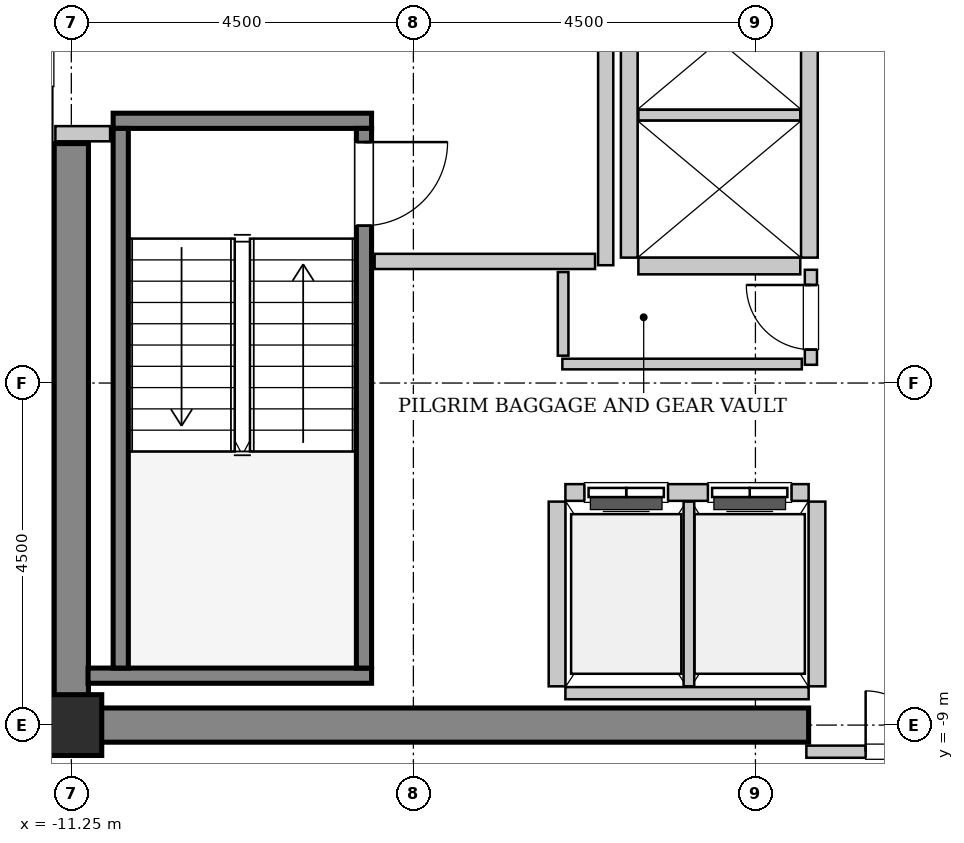
"""IFC4 building model, lengths in metres.
Left out: names, types, materials, properties, quantities, classifications, styles, units other than length and angle.
Written with IfcOpenShell. Run it as: python <this file> out.ifc"""

import sys

from ifc_helpers import new_model, si_unit, direction, frame, frame_2d, origin, origin_2d, place, context, subcontext, project, spatial, rectangle, hollow_rectangle, extrude, source, transform, mapped, element, fill, save


model = new_model("IFC4")
c1 = context("Model", 3, precision=1e-05, world=origin(), true_north=direction((0.0, 1.0)))
c2 = subcontext(c1, "Body", "Model", "MODEL_VIEW")
j1 = project(units=[si_unit("LENGTHUNIT", "METRE"), si_unit("PLANEANGLEUNIT", "RADIAN")], contexts=[c1])
p1 = place(None, origin())
s1 = spatial("IfcSite", under=j1, at=p1, CompositionType="ELEMENT")
p2 = place(p1, origin())
s2 = spatial("IfcBuilding", under=s1, at=p2, CompositionType="ELEMENT")
p3 = place(p2, frame((0.0, 0.0, 214.2)))
s3 = spatial("IfcBuildingStorey", under=s2, at=p3, CompositionType="ELEMENT", Elevation=214.2)
m1 = source(origin(), c2, "Body", "SweptSolid", [
    extrude(rectangle(XDim=9.925, YDim=0.45, at=frame_2d((4.962, 0.0))), origin(), (0.0, 0.0, 1.0), 3.8),
])
p4 = place(p3, frame((-11.475, -9.0, 0.0), z_axis=(0.0, 0.0, 1.0), x_axis=(1.0, 0.0, 0.0)))
e1 = element("IfcWall", 1, at=p4, inside=s3, PredefinedType="SHEAR", context=c2, shape_type="MappedRepresentation", body=[
    mapped(m1, transform((0.0, 0.0, 0.0), x_axis=(1.0, 0.0, 0.0), y_axis=(0.0, 1.0, 0.0), z_axis=(0.0, 0.0, 1.0), scale=1.0)),
])
m2 = source(origin(), c2, "Body", "SweptSolid", [
    extrude(rectangle(XDim=7.425, YDim=0.45, at=frame_2d((3.712, 0.0))), origin(), (0.0, 0.0, 1.0), 3.8),
])
p5 = place(p3, frame((-11.25, -8.775, 0.0), z_axis=(0.0, 0.0, 1.0), x_axis=(0.0, 1.0, 0.0)))
e2 = element("IfcWall", 2, at=p5, inside=s3, PredefinedType="SHEAR", context=c2, shape_type="MappedRepresentation", body=[
    mapped(m2, transform((0.0, 0.0, 0.0), x_axis=(1.0, 0.0, 0.0), y_axis=(0.0, 1.0, 0.0), z_axis=(0.0, 0.0, 1.0), scale=1.0)),
])
m3 = source(origin(), c2, "Body", "SweptSolid", [
    extrude(hollow_rectangle(XDim=0.8, YDim=0.8, WallThickness=0.04, InnerFilletRadius=0.04, OuterFilletRadius=0.08, at=origin_2d()), origin(), (0.0, 0.0, 1.0), 3.8),
])
p6 = place(p3, frame((-11.25, -9.0, 0.0), z_axis=(0.0, 0.0, 1.0), x_axis=(1.0, 0.0, 0.0)))
e3 = element("IfcColumn", 3, at=p6, inside=s3, PredefinedType="COLUMN", context=c2, shape_type="MappedRepresentation", body=[
    mapped(m3, transform((0.0, 0.0, 0.0), x_axis=(1.0, 0.0, 0.0), y_axis=(0.0, 1.0, 0.0), z_axis=(0.0, 0.0, 1.0), scale=1.0)),
])
m4 = source(origin(), c2, "Body", "SweptSolid", [
    extrude(rectangle(XDim=3.4, YDim=0.2, at=frame_2d((1.7, 0.0))), origin(), (0.0, 0.0, 1.0), 3.8),
])
p7 = place(p3, frame((-10.7, -1.05, 0.0), z_axis=(0.0, 0.0, 1.0), x_axis=(1.0, 0.0, 0.0)))
e4 = element("IfcWall", 4, at=p7, inside=s3, PredefinedType="SOLIDWALL", context=c2, shape_type="MappedRepresentation", body=[
    mapped(m4, transform((0.0, 0.0, 0.0), x_axis=(1.0, 0.0, 0.0), y_axis=(0.0, 1.0, 0.0), z_axis=(0.0, 0.0, 1.0), scale=1.0)),
])
m5 = source(origin(), c2, "Body", "SweptSolid", [
    extrude(rectangle(XDim=3.73, YDim=0.2, at=frame_2d((1.865, 0.0))), origin(), (0.0, 0.0, 1.0), 3.8),
])
p8 = place(p3, frame((-11.03, -8.35, 0.0), z_axis=(0.0, 0.0, 1.0), x_axis=(1.0, 0.0, 0.0)))
e5 = element("IfcWall", 5, at=p8, inside=s3, PredefinedType="SOLIDWALL", context=c2, shape_type="MappedRepresentation", body=[
    mapped(m5, transform((0.0, 0.0, 0.0), x_axis=(1.0, 0.0, 0.0), y_axis=(0.0, 1.0, 0.0), z_axis=(0.0, 0.0, 1.0), scale=1.0)),
])
m6 = source(origin(), c2, "Body", "SweptSolid", [
    extrude(rectangle(XDim=7.1, YDim=0.2, at=frame_2d((3.55, 0.0))), origin(), (0.0, 0.0, 1.0), 3.8),
])
p9 = place(p3, frame((-10.6, -1.15, 0.0), z_axis=(0.0, 0.0, 1.0), x_axis=(0.0, -1.0, 0.0)))
e6 = element("IfcWall", 6, at=p9, inside=s3, PredefinedType="SOLIDWALL", context=c2, shape_type="MappedRepresentation", body=[
    mapped(m6, transform((0.0, 0.0, 0.0), x_axis=(1.0, 0.0, 0.0), y_axis=(0.0, 1.0, 0.0), z_axis=(0.0, 0.0, 1.0), scale=1.0)),
])
p10 = place(p3, frame((-7.4, -1.15, 0.0), z_axis=(0.0, 0.0, 1.0), x_axis=(0.0, -1.0, 0.0)))
e7 = element("IfcWall", 7, at=p10, inside=s3, PredefinedType="SOLIDWALL", context=c2, shape_type="MappedRepresentation", body=[
    mapped(m6, transform((0.0, 0.0, 0.0), x_axis=(1.0, 0.0, 0.0), y_axis=(0.0, 1.0, 0.0), z_axis=(0.0, 0.0, 1.0), scale=1.0)),
])
p11 = place(p10, frame((0.18, 0.0, 0.0)))
e8 = element("IfcOpeningElement", 8, at=p11, cuts=e7, PredefinedType="OPENING", context=c2, shape_type="SweptSolid", body=[
    extrude(rectangle(XDim=1.1, YDim=2.15, at=frame_2d((0.55, 1.075))), frame((0.0, 0.11, 0.0), z_axis=(0.0, -1.0, 0.0), x_axis=(1.0, 0.0, 0.0)), (0.0, 0.0, 1.0), 0.22),
])
m7 = source(origin(), c2, "Body", "SweptSolid", [
    extrude(rectangle(XDim=3.2, YDim=0.22, at=frame_2d((1.6, 0.0))), origin(), (0.0, 0.0, 1.0), 3.535),
])
p12 = place(p3, frame((-1.55, -5.94, 0.0), z_axis=(0.0, 0.0, 1.0), x_axis=(-1.0, 0.0, 0.0)))
e9 = element("IfcWall", 9, at=p12, inside=s3, PredefinedType="SOLIDWALL", context=c2, shape_type="MappedRepresentation", body=[
    mapped(m7, transform((0.0, 0.0, 0.0), x_axis=(1.0, 0.0, 0.0), y_axis=(0.0, 1.0, 0.0), z_axis=(0.0, 0.0, 1.0), scale=1.0)),
])
p13 = place(p12, frame((1.85, 0.0, 0.0)))
e10 = element("IfcOpeningElement", 10, at=p13, cuts=e9, PredefinedType="OPENING", context=c2, shape_type="SweptSolid", body=[
    extrude(rectangle(XDim=1.1, YDim=2.2, at=frame_2d((0.55, 1.1))), frame((0.0, 0.12, 0.0), z_axis=(0.0, -1.0, 0.0), x_axis=(1.0, 0.0, 0.0)), (0.0, 0.0, 1.0), 0.24),
])
p14 = place(p12, frame((0.225, 0.0, 0.0)))
e11 = element("IfcOpeningElement", 11, at=p14, cuts=e9, PredefinedType="OPENING", context=c2, shape_type="SweptSolid", body=[
    extrude(rectangle(XDim=1.1, YDim=2.2, at=frame_2d((0.55, 1.1))), frame((0.0, 0.12, 0.0), z_axis=(0.0, -1.0, 0.0), x_axis=(1.0, 0.0, 0.0)), (0.0, 0.0, 1.0), 0.24),
])
m8 = source(origin(), c2, "Body", "SweptSolid", [
    extrude(rectangle(XDim=3.2, YDim=0.16, at=frame_2d((1.6, 0.0))), origin(), (0.0, 0.0, 1.0), 2.625),
])
p15 = place(p3, frame((-4.75, -8.58, 0.0), z_axis=(0.0, 0.0, 1.0), x_axis=(1.0, 0.0, 0.0)))
e12 = element("IfcWall", 12, at=p15, inside=s3, PredefinedType="PARTITIONING", context=c2, shape_type="MappedRepresentation", body=[
    mapped(m8, transform((0.0, 0.0, 0.0), x_axis=(1.0, 0.0, 0.0), y_axis=(0.0, 1.0, 0.0), z_axis=(0.0, 0.0, 1.0), scale=1.0)),
])
m9 = source(origin(), c2, "Body", "SweptSolid", [
    extrude(rectangle(XDim=2.43, YDim=0.22, at=frame_2d((1.215, 0.0))), origin(), (0.0, 0.0, 1.0), 3.535),
])
p16 = place(p3, frame((-4.86, -6.06, 0.0), z_axis=(0.0, 0.0, 1.0), x_axis=(0.0, -1.0, 0.0)))
e13 = element("IfcWall", 13, at=p16, inside=s3, PredefinedType="SOLIDWALL", context=c2, shape_type="MappedRepresentation", body=[
    mapped(m9, transform((0.0, 0.0, 0.0), x_axis=(1.0, 0.0, 0.0), y_axis=(0.0, 1.0, 0.0), z_axis=(0.0, 0.0, 1.0), scale=1.0)),
])
m10 = source(origin(), c2, "Body", "SweptSolid", [
    extrude(rectangle(XDim=2.43, YDim=0.14, at=frame_2d((1.215, 0.0))), origin(), (0.0, 0.0, 1.0), 3.535),
])
p17 = place(p3, frame((-3.125, -8.49, 0.0), z_axis=(0.0, 0.0, 1.0), x_axis=(0.0, 1.0, 0.0)))
e14 = element("IfcWall", 14, at=p17, inside=s3, PredefinedType="PARTITIONING", context=c2, shape_type="MappedRepresentation", body=[
    mapped(m10, transform((0.0, 0.0, 0.0), x_axis=(1.0, 0.0, 0.0), y_axis=(0.0, 1.0, 0.0), z_axis=(0.0, 0.0, 1.0), scale=1.0)),
])
p18 = place(p3, frame((-1.44, -8.49, 0.0), z_axis=(0.0, 0.0, 1.0), x_axis=(0.0, 1.0, 0.0)))
e15 = element("IfcWall", 15, at=p18, inside=s3, PredefinedType="SOLIDWALL", context=c2, shape_type="MappedRepresentation", body=[
    mapped(m9, transform((0.0, 0.0, 0.0), x_axis=(1.0, 0.0, 0.0), y_axis=(0.0, 1.0, 0.0), z_axis=(0.0, 0.0, 1.0), scale=1.0)),
])
m11 = source(origin(), c2, "Body", "SweptSolid", [
    extrude(rectangle(XDim=5.7, YDim=0.22, at=frame_2d((2.85, 0.0))), origin(), (0.0, 0.0, 1.0), 3.535),
])
for number, where, z_axis, x_axis in (
    (16, (-1.54, -2.85, 0.0), (0.0, 0.0, 1.0), (0.0, 1.0, 0.0)),
    (17, (-3.91, 2.85, 0.0), (0.0, 0.0, 1.0), (0.0, -1.0, 0.0)),
):
    element("IfcWall", number, at=place(p3, frame(where, z_axis=z_axis, x_axis=x_axis)), inside=s3, PredefinedType="SOLIDWALL", context=c2, shape_type="MappedRepresentation", body=[
        mapped(m11, transform((0.0, 0.0, 0.0), x_axis=(1.0, 0.0, 0.0), y_axis=(0.0, 1.0, 0.0), z_axis=(0.0, 0.0, 1.0), scale=1.0)),
    ])
m12 = source(origin(), c2, "Body", "SweptSolid", [
    extrude(rectangle(XDim=2.13, YDim=0.22, at=frame_2d((1.065, 0.0))), origin(), (0.0, 0.0, 1.0), 3.535),
])
p19 = place(p3, frame((-3.79, -2.96, 0.0), z_axis=(0.0, 0.0, 1.0), x_axis=(1.0, 0.0, 0.0)))
e18 = element("IfcWall", 18, at=p19, inside=s3, PredefinedType="SOLIDWALL", context=c2, shape_type="MappedRepresentation", body=[
    mapped(m12, transform((0.0, 0.0, 0.0), x_axis=(1.0, 0.0, 0.0), y_axis=(0.0, 1.0, 0.0), z_axis=(0.0, 0.0, 1.0), scale=1.0)),
])
m13 = source(origin(), c2, "Body", "SweptSolid", [
    extrude(rectangle(XDim=2.13, YDim=0.14, at=frame_2d((1.065, 0.0))), origin(), (0.0, 0.0, 1.0), 3.535),
])
p20 = place(p3, frame((-3.79, -0.975, 0.0), z_axis=(0.0, 0.0, 1.0), x_axis=(1.0, 0.0, 0.0)))
e19 = element("IfcWall", 19, at=p20, inside=s3, PredefinedType="PARTITIONING", context=c2, shape_type="MappedRepresentation", body=[
    mapped(m13, transform((0.0, 0.0, 0.0), x_axis=(1.0, 0.0, 0.0), y_axis=(0.0, 1.0, 0.0), z_axis=(0.0, 0.0, 1.0), scale=1.0)),
])
m14 = source(origin(), c2, "Body", "SweptSolid", [
    extrude(rectangle(XDim=5.9, YDim=0.2, at=frame_2d((2.95, 0.0))), origin(), (0.0, 0.0, 1.0), 3.535),
])
p21 = place(p3, frame((-4.22, -2.95, 0.0), z_axis=(0.0, 0.0, 1.0), x_axis=(0.0, 1.0, 0.0)))
e20 = element("IfcWall", 20, at=p21, inside=s3, PredefinedType="PARTITIONING", context=c2, shape_type="MappedRepresentation", body=[
    mapped(m14, transform((0.0, 0.0, 0.0), x_axis=(1.0, 0.0, 0.0), y_axis=(0.0, 1.0, 0.0), z_axis=(0.0, 0.0, 1.0), scale=1.0)),
])
m15 = source(origin(), c2, "Body", "SweptSolid", [
    extrude(rectangle(XDim=2.9, YDim=0.2, at=frame_2d((1.45, 0.0))), origin(), (0.0, 0.0, 1.0), 3.535),
])
p22 = place(p3, frame((-7.26, -2.9, 0.0), z_axis=(0.0, 0.0, 1.0), x_axis=(1.0, 0.0, 0.0)))
e21 = element("IfcWall", 21, at=p22, inside=s3, PredefinedType="PARTITIONING", context=c2, shape_type="MappedRepresentation", body=[
    mapped(m15, transform((0.0, 0.0, 0.0), x_axis=(1.0, 0.0, 0.0), y_axis=(0.0, 1.0, 0.0), z_axis=(0.0, 0.0, 1.0), scale=1.0)),
])
m16 = source(origin(), c2, "Body", "SweptSolid", [
    extrude(rectangle(XDim=0.72, YDim=0.2, at=frame_2d((0.36, 0.0))), origin(), (0.0, 0.0, 1.0), 3.535),
])
p23 = place(p3, frame((-11.46, -1.22, 0.0), z_axis=(0.0, 0.0, 1.0), x_axis=(1.0, 0.0, 0.0)))
e22 = element("IfcWall", 22, at=p23, inside=s3, PredefinedType="PARTITIONING", context=c2, shape_type="MappedRepresentation", body=[
    mapped(m16, transform((0.0, 0.0, 0.0), x_axis=(1.0, 0.0, 0.0), y_axis=(0.0, 1.0, 0.0), z_axis=(0.0, 0.0, 1.0), scale=1.0)),
])
m17 = source(origin(), c2, "Body", "SweptSolid", [
    extrude(rectangle(XDim=3.16, YDim=0.16, at=frame_2d((1.58, 0.0))), origin(), (0.0, 0.0, 1.0), 2.625),
])
p24 = place(p3, frame((-1.58, -9.35, 0.0), z_axis=(0.0, 0.0, 1.0), x_axis=(1.0, 0.0, 0.0)))
e23 = element("IfcWall", 23, at=p24, inside=s3, PredefinedType="PARTITIONING", context=c2, shape_type="MappedRepresentation", body=[
    mapped(m17, transform((0.0, 0.0, 0.0), x_axis=(1.0, 0.0, 0.0), y_axis=(0.0, 1.0, 0.0), z_axis=(0.0, 0.0, 1.0), scale=1.0)),
])
p25 = place(p24, frame((0.78, 0.0, 0.0)))
e24 = element("IfcOpeningElement", 24, at=p25, cuts=e23, PredefinedType="OPENING", context=c2, shape_type="SweptSolid", body=[
    extrude(rectangle(XDim=1.6, YDim=2.3, at=frame_2d((0.8, 1.15))), frame((0.0, 0.09, 0.0), z_axis=(0.0, -1.0, 0.0), x_axis=(1.0, 0.0, 0.0)), (0.0, 0.0, 1.0), 0.18),
])
m18 = source(origin(), c2, "Body", "SweptSolid", [
    extrude(rectangle(XDim=1.25, YDim=0.16, at=frame_2d((0.625, 0.0))), origin(), (0.0, 0.0, 1.0), 3.535),
])
p26 = place(p3, frame((-1.52, -4.26, 0.0), z_axis=(0.0, 0.0, 1.0), x_axis=(0.0, 1.0, 0.0)))
e25 = element("IfcWall", 25, at=p26, inside=s3, PredefinedType="PARTITIONING", context=c2, shape_type="MappedRepresentation", body=[
    mapped(m18, transform((0.0, 0.0, 0.0), x_axis=(1.0, 0.0, 0.0), y_axis=(0.0, 1.0, 0.0), z_axis=(0.0, 0.0, 1.0), scale=1.0)),
])
p27 = place(p26, frame((0.2, 0.0, 0.0)))
e26 = element("IfcOpeningElement", 26, at=p27, cuts=e25, PredefinedType="OPENING", context=c2, shape_type="SweptSolid", body=[
    extrude(rectangle(XDim=0.85, YDim=2.1, at=frame_2d((0.425, 1.05))), frame((0.0, 0.09, 0.0), z_axis=(0.0, -1.0, 0.0), x_axis=(1.0, 0.0, 0.0)), (0.0, 0.0, 1.0), 0.18),
])
m19 = source(origin(), c2, "Body", "SweptSolid", [
    extrude(rectangle(XDim=3.15, YDim=0.14, at=frame_2d((1.575, 0.0))), origin(), (0.0, 0.0, 1.0), 3.535),
])
p28 = place(p3, frame((-4.79, -4.25, 0.0), z_axis=(0.0, 0.0, 1.0), x_axis=(1.0, 0.0, 0.0)))
e27 = element("IfcWall", 27, at=p28, inside=s3, PredefinedType="PARTITIONING", context=c2, shape_type="MappedRepresentation", body=[
    mapped(m19, transform((0.0, 0.0, 0.0), x_axis=(1.0, 0.0, 0.0), y_axis=(0.0, 1.0, 0.0), z_axis=(0.0, 0.0, 1.0), scale=1.0)),
])
m20 = source(origin(), c2, "Body", "SweptSolid", [
    extrude(rectangle(XDim=1.1, YDim=0.14, at=frame_2d((0.55, 0.0))), origin(), (0.0, 0.0, 1.0), 3.535),
])
p29 = place(p3, frame((-4.78, -4.14, 0.0), z_axis=(0.0, 0.0, 1.0), x_axis=(0.0, 1.0, 0.0)))
e28 = element("IfcWall", 28, at=p29, inside=s3, PredefinedType="PARTITIONING", context=c2, shape_type="MappedRepresentation", body=[
    mapped(m20, transform((0.0, 0.0, 0.0), x_axis=(1.0, 0.0, 0.0), y_axis=(0.0, 1.0, 0.0), z_axis=(0.0, 0.0, 1.0), scale=1.0)),
])
m21 = source(origin(), c2, "Body", "SweptSolid", [
    extrude(rectangle(XDim=1.1, YDim=2.15, at=frame_2d((0.55, 1.075))), frame((0.0, 0.025, 0.0), z_axis=(0.0, -1.0, 0.0), x_axis=(1.0, 0.0, 0.0)), (0.0, 0.0, 1.0), 0.05),
])
p30 = place(p11, origin())
e29 = element("IfcDoor", 29, at=p30, inside=s3, OperationType="SINGLE_SWING_LEFT", PredefinedType="DOOR", context=c2, shape_type="MappedRepresentation", body=[
    mapped(m21, transform((0.0, 0.0, 0.0), x_axis=(1.0, 0.0, 0.0), y_axis=(0.0, 1.0, 0.0), z_axis=(0.0, 0.0, 1.0), scale=1.0)),
])
fill(e8, e29)
m22 = source(origin(), c2, "Body", "SweptSolid", [
    extrude(rectangle(XDim=1.1, YDim=2.2, at=frame_2d((0.55, 1.1))), frame((0.0, 0.025, 0.0), z_axis=(0.0, -1.0, 0.0), x_axis=(1.0, 0.0, 0.0)), (0.0, 0.0, 1.0), 0.05),
])
p31 = place(p13, origin())
e30 = element("IfcDoor", 30, at=p31, inside=s3, OperationType="DOUBLE_DOOR_SLIDING", PredefinedType="DOOR", context=c2, shape_type="MappedRepresentation", body=[
    mapped(m22, transform((0.0, 0.0, 0.0), x_axis=(1.0, 0.0, 0.0), y_axis=(0.0, 1.0, 0.0), z_axis=(0.0, 0.0, 1.0), scale=1.0)),
])
fill(e10, e30)
p32 = place(p14, origin())
e31 = element("IfcDoor", 31, at=p32, inside=s3, OperationType="DOUBLE_DOOR_SLIDING", PredefinedType="DOOR", context=c2, shape_type="MappedRepresentation", body=[
    mapped(m22, transform((0.0, 0.0, 0.0), x_axis=(1.0, 0.0, 0.0), y_axis=(0.0, 1.0, 0.0), z_axis=(0.0, 0.0, 1.0), scale=1.0)),
])
fill(e11, e31)
m23 = source(origin(), c2, "Body", "SweptSolid", [
    extrude(rectangle(XDim=1.6, YDim=2.3, at=frame_2d((0.8, 1.15))), frame((0.0, 0.025, 0.0), z_axis=(0.0, -1.0, 0.0), x_axis=(1.0, 0.0, 0.0)), (0.0, 0.0, 1.0), 0.05),
])
p33 = place(p25, origin())
e32 = element("IfcDoor", 32, at=p33, inside=s3, OperationType="DOUBLE_DOOR_SINGLE_SWING", PredefinedType="DOOR", context=c2, shape_type="MappedRepresentation", body=[
    mapped(m23, transform((0.0, 0.0, 0.0), x_axis=(1.0, 0.0, 0.0), y_axis=(0.0, 1.0, 0.0), z_axis=(0.0, 0.0, 1.0), scale=1.0)),
])
fill(e24, e32)
m24 = source(origin(), c2, "Body", "SweptSolid", [
    extrude(rectangle(XDim=0.85, YDim=2.1, at=frame_2d((0.425, 1.05))), frame((0.0, 0.025, 0.0), z_axis=(0.0, -1.0, 0.0), x_axis=(1.0, 0.0, 0.0)), (0.0, 0.0, 1.0), 0.05),
])
p34 = place(p27, origin())
e33 = element("IfcDoor", 33, at=p34, inside=s3, OperationType="SINGLE_SWING_RIGHT", PredefinedType="DOOR", context=c2, shape_type="MappedRepresentation", body=[
    mapped(m24, transform((0.0, 0.0, 0.0), x_axis=(1.0, 0.0, 0.0), y_axis=(0.0, 1.0, 0.0), z_axis=(0.0, 0.0, 1.0), scale=1.0)),
])
fill(e26, e33)
save(model, sys.argv[1])
